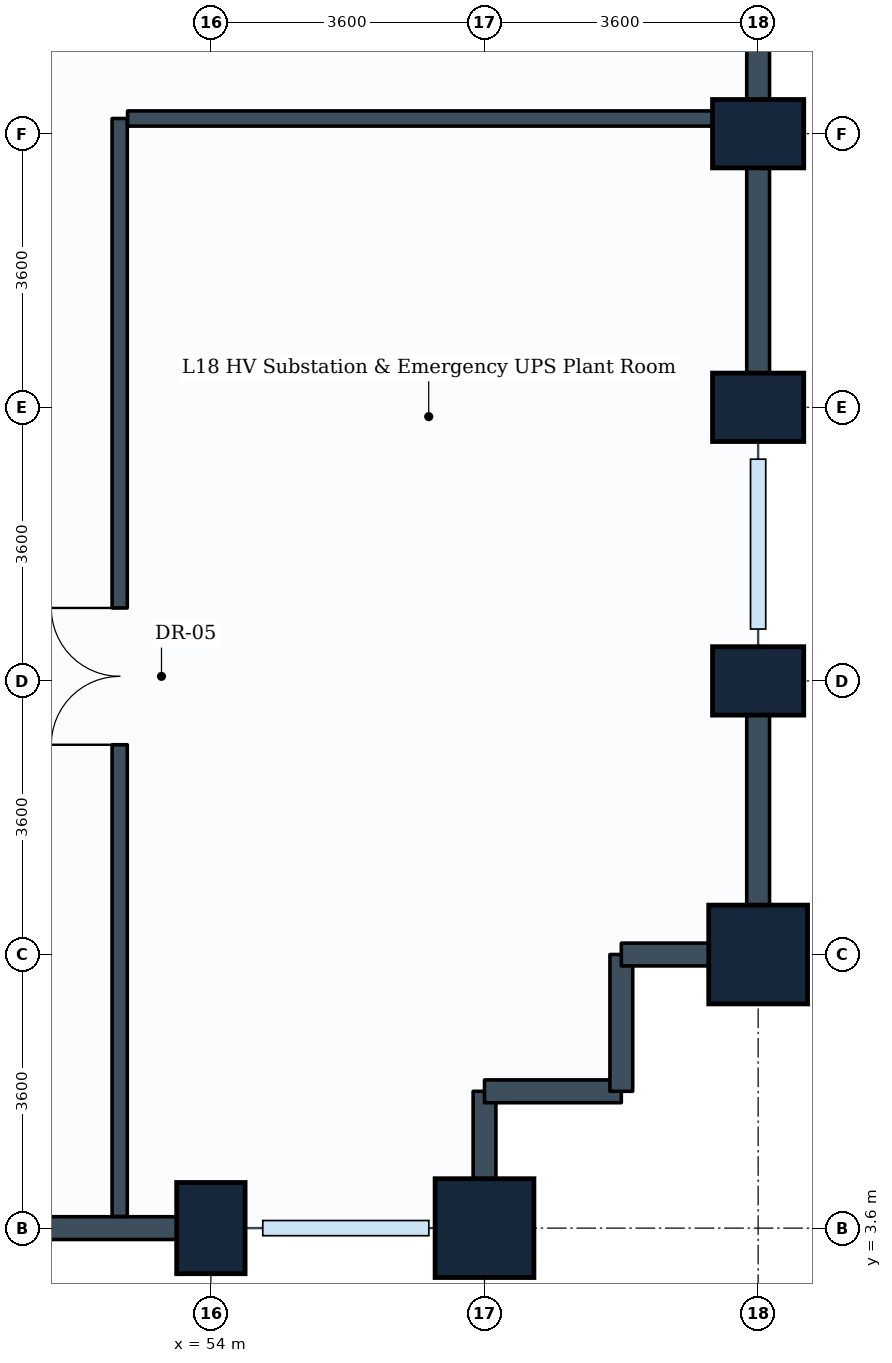
"""IFC4 building model, lengths in metres.
Left out: names, types, materials, properties, quantities, classifications, styles, units other than length and angle.
Written with IfcOpenShell. Run it as: python <this file> out.ifc"""

import sys

from ifc_helpers import new_model, si_unit, direction, frame, frame_2d, origin, origin_2d, place, context, subcontext, project, spatial, rectangle, extrude, element, fill, save


model = new_model("IFC4")
c1 = context("Model", 3, precision=1e-05, world=origin(), true_north=direction((0.0, 1.0)))
c2 = subcontext(c1, "Body", "Model", "MODEL_VIEW")
j1 = project(units=[si_unit("LENGTHUNIT", "METRE"), si_unit("PLANEANGLEUNIT", "RADIAN")], contexts=[c1])
p1 = place(None, origin())
s1 = spatial("IfcSite", under=j1, at=p1, CompositionType="ELEMENT")
p2 = place(p1, origin())
s2 = spatial("IfcBuilding", under=s1, at=p2, CompositionType="ELEMENT")
p3 = place(p2, frame((0.0, 0.0, 74.7)))
s3 = spatial("IfcBuildingStorey", under=s2, at=p3, CompositionType="ELEMENT", Elevation=74.7)
p4 = place(p3, frame((54.0, 3.6, 0.0), z_axis=(0.0, 0.0, 1.0), x_axis=(1.0, 0.0, 0.0)))
e1 = element("IfcColumn", 1, at=p4, inside=s3, PredefinedType="COLUMN", context=c2, shape_type="SweptSolid", body=[
    extrude(rectangle(XDim=0.9, YDim=1.2, at=origin_2d()), origin(), (0.0, 0.0, 1.0), 5.4),
])
for number, where, z_axis, x_axis in (
    (2, (57.6, 3.6, 0.0), (0.0, 0.0, 1.0), (1.0, 0.0, 0.0)),
    (3, (61.2, 7.2, 0.0), (0.0, 0.0, 1.0), (1.0, 0.0, 0.0)),
):
    element("IfcColumn", number, at=place(p3, frame(where, z_axis=z_axis, x_axis=x_axis)), inside=s3, PredefinedType="COLUMN", context=c2, shape_type="SweptSolid", body=[
        extrude(rectangle(XDim=1.3, YDim=1.3, at=origin_2d()), origin(), (0.0, 0.0, 1.0), 5.4),
    ])
for number, where, z_axis, x_axis in (
    (4, (61.2, 10.8, 0.0), (0.0, 0.0, 1.0), (0.0, 1.0, 0.0)),
    (5, (61.2, 14.4, 0.0), (0.0, 0.0, 1.0), (0.0, 1.0, 0.0)),
    (6, (61.2, 18.0, 0.0), (0.0, 0.0, 1.0), (0.0, 1.0, 0.0)),
):
    element("IfcColumn", number, at=place(p3, frame(where, z_axis=z_axis, x_axis=x_axis)), inside=s3, PredefinedType="COLUMN", context=c2, shape_type="SweptSolid", body=[
        extrude(rectangle(XDim=0.9, YDim=1.2, at=origin_2d()), origin(), (0.0, 0.0, 1.0), 5.4),
    ])
p5 = place(p3, frame((54.0, 3.6, 0.0), z_axis=(0.0, 0.0, 1.0), x_axis=(-1.0, 0.0, 0.0)))
e7 = element("IfcWall", 7, at=p5, inside=s3, PredefinedType="STANDARD", context=c2, shape_type="SweptSolid", body=[
    extrude(rectangle(XDim=3.6, YDim=0.3, at=frame_2d((1.8, 0.0))), origin(), (0.0, 0.0, 1.0), 4.43),
])
for number, where, z_axis, x_axis in (
    (8, (57.6, 5.4, 0.0), (0.0, 0.0, 1.0), (0.0, -1.0, 0.0)),
    (9, (59.4, 5.4, 0.0), (0.0, 0.0, 1.0), (-1.0, 0.0, 0.0)),
):
    element("IfcWall", number, at=place(p3, frame(where, z_axis=z_axis, x_axis=x_axis)), inside=s3, PredefinedType="STANDARD", context=c2, shape_type="SweptSolid", body=[
        extrude(rectangle(XDim=1.8, YDim=0.3, at=frame_2d((0.9, 0.0))), origin(), (0.0, 0.0, 1.0), 3.58),
    ])
p6 = place(p3, frame((59.4, 7.2, 0.0), z_axis=(0.0, 0.0, 1.0), x_axis=(0.0, -1.0, 0.0)))
e10 = element("IfcWall", 10, at=p6, inside=s3, PredefinedType="STANDARD", context=c2, shape_type="SweptSolid", body=[
    extrude(rectangle(XDim=1.8, YDim=0.3, at=frame_2d((0.9, 0.0))), origin(), (0.0, 0.0, 1.0), 5.065),
])
p7 = place(p3, frame((61.2, 7.2, 0.0), z_axis=(0.0, 0.0, 1.0), x_axis=(-1.0, 0.0, 0.0)))
e11 = element("IfcWall", 11, at=p7, inside=s3, PredefinedType="STANDARD", context=c2, shape_type="SweptSolid", body=[
    extrude(rectangle(XDim=1.8, YDim=0.3, at=frame_2d((0.9, 0.0))), origin(), (0.0, 0.0, 1.0), 4.03),
])
p8 = place(p3, frame((61.2, 10.8, 0.0), z_axis=(0.0, 0.0, 1.0), x_axis=(0.0, -1.0, 0.0)))
e12 = element("IfcWall", 12, at=p8, inside=s3, PredefinedType="STANDARD", context=c2, shape_type="SweptSolid", body=[
    extrude(rectangle(XDim=3.6, YDim=0.3, at=frame_2d((1.8, 0.0))), origin(), (0.0, 0.0, 1.0), 4.03),
])
p9 = place(p3, frame((61.2, 18.0, 0.0), z_axis=(0.0, 0.0, 1.0), x_axis=(0.0, -1.0, 0.0)))
e13 = element("IfcWall", 13, at=p9, inside=s3, PredefinedType="STANDARD", context=c2, shape_type="SweptSolid", body=[
    extrude(rectangle(XDim=3.6, YDim=0.3, at=frame_2d((1.8, 0.0))), origin(), (0.0, 0.0, 1.0), 3.58),
])
p10 = place(p3, frame((61.2, 21.6, 0.0), z_axis=(0.0, 0.0, 1.0), x_axis=(0.0, -1.0, 0.0)))
e14 = element("IfcWall", 14, at=p10, inside=s3, PredefinedType="STANDARD", context=c2, shape_type="SweptSolid", body=[
    extrude(rectangle(XDim=3.6, YDim=0.3, at=frame_2d((1.8, 0.0))), origin(), (0.0, 0.0, 1.0), 4.03),
])
p11 = place(p3, frame((52.8, 3.754, 0.0), z_axis=(0.0, 0.0, 1.0), x_axis=(0.0, 1.0, 0.0)))
e15 = element("IfcWall", 15, at=p11, inside=s3, PredefinedType="PARTITIONING", context=c2, shape_type="SweptSolid", body=[
    extrude(rectangle(XDim=14.446, YDim=0.2, at=frame_2d((7.223, 0.0))), origin(), (0.0, 0.0, 1.0), 3.58),
])
p12 = place(p11, frame((6.206, 0.0, 0.0)))
e16 = element("IfcOpeningElement", 16, at=p12, cuts=e15, PredefinedType="OPENING", context=c2, shape_type="SweptSolid", body=[
    extrude(rectangle(XDim=1.8, YDim=2.2, at=frame_2d((0.9, 1.1))), frame((0.0, 0.11, 0.0), z_axis=(0.0, -1.0, 0.0), x_axis=(1.0, 0.0, 0.0)), (0.0, 0.0, 1.0), 0.22),
])
p13 = place(p3, frame((52.904, 18.2, 0.0), z_axis=(0.0, 0.0, 1.0), x_axis=(1.0, 0.0, 0.0)))
e17 = element("IfcWall", 17, at=p13, inside=s3, PredefinedType="PARTITIONING", context=c2, shape_type="SweptSolid", body=[
    extrude(rectangle(XDim=8.142, YDim=0.2, at=frame_2d((4.071, 0.0))), origin(), (0.0, 0.0, 1.0), 3.58),
])
p14 = place(p12, origin())
e18 = element("IfcDoor", 18, at=p14, inside=s3, OperationType="DOUBLE_DOOR_SINGLE_SWING", PredefinedType="DOOR", context=c2, shape_type="SweptSolid", body=[
    extrude(rectangle(XDim=1.8, YDim=2.2, at=frame_2d((0.9, 1.1))), frame((0.0, 0.025, 0.0), z_axis=(0.0, -1.0, 0.0), x_axis=(1.0, 0.0, 0.0)), (0.0, 0.0, 1.0), 0.05),
])
fill(e16, e18)
save(model, sys.argv[1])
